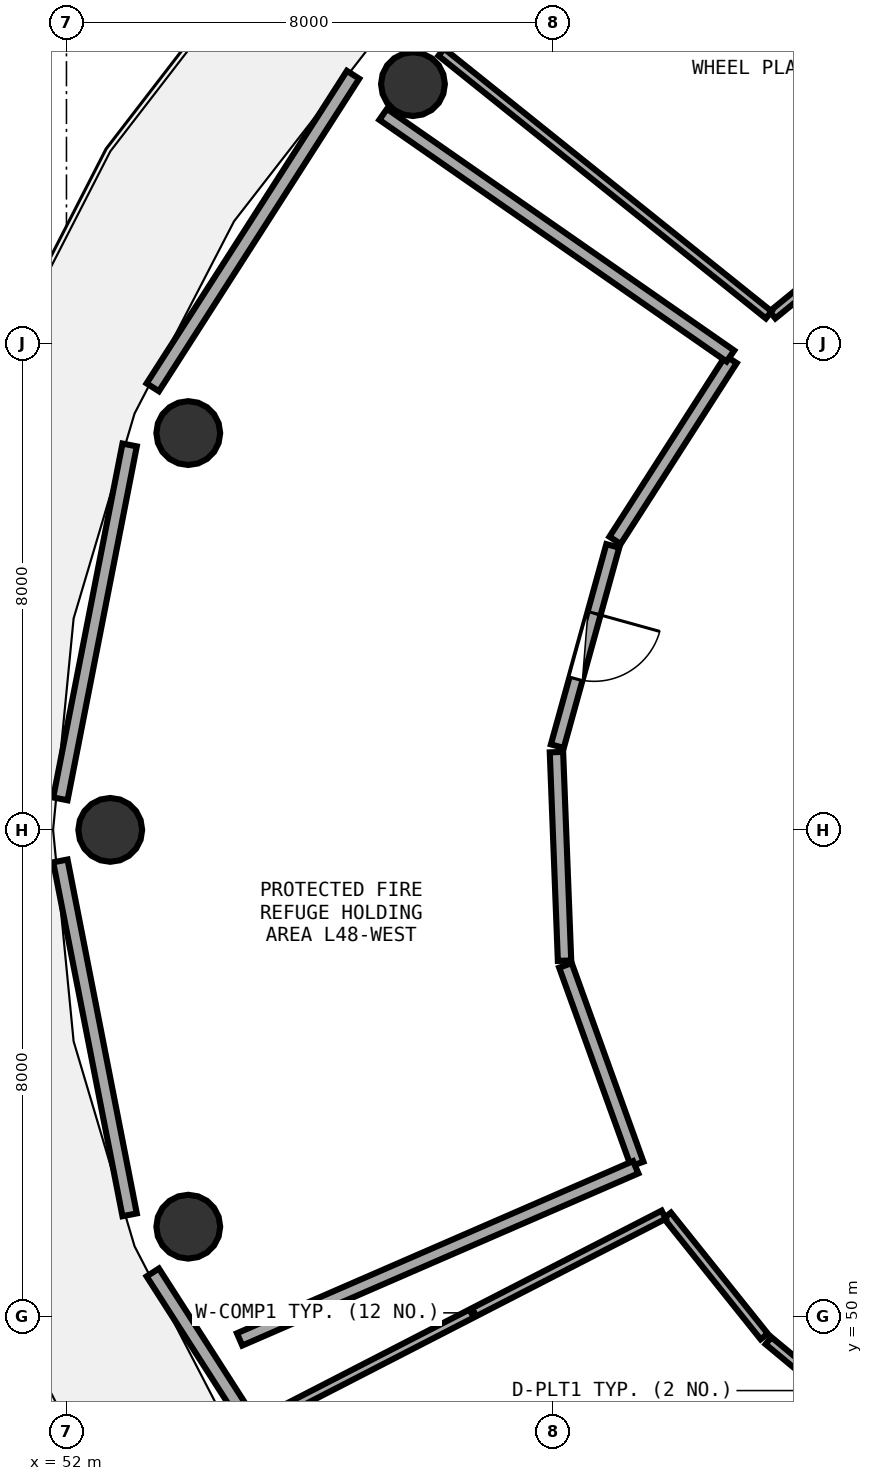
"""IFC4 building model, lengths in metres.
Left out: names, types, materials, properties, quantities, classifications, styles, units other than length and angle.
Written with IfcOpenShell. Run it as: python <this file> out.ifc"""

import sys

from ifc_helpers import new_model, si_unit, direction, frame, frame_2d, origin, origin_2d, place, context, subcontext, project, spatial, rectangle, circle, extrude, element, fill, save


model = new_model("IFC4")
c1 = context("Model", 3, precision=1e-05, world=origin(), true_north=direction((0.0, 1.0)))
c2 = subcontext(c1, "Body", "Model", "MODEL_VIEW")
j1 = project(units=[si_unit("LENGTHUNIT", "METRE"), si_unit("PLANEANGLEUNIT", "RADIAN")], contexts=[c1])
p1 = place(None, origin())
s1 = spatial("IfcSite", under=j1, at=p1, CompositionType="ELEMENT")
p2 = place(p1, origin())
s2 = spatial("IfcBuilding", under=s1, at=p2, CompositionType="ELEMENT")
p3 = place(p2, frame((0.0, 0.0, 189.11)))
s3 = spatial("IfcBuildingStorey", under=s2, at=p3, CompositionType="ELEMENT", Elevation=189.11)
for number, where, z_axis, x_axis in (
    (1, (57.698, 70.264, 0.0), (0.0, 0.0, 1.0), (1.0, 0.0, 0.0)),
    (2, (54.003, 64.526, 0.0), (0.0, 0.0, 1.0), (1.0, 0.0, 0.0)),
    (3, (52.72, 58.0, 0.0), (0.0, 0.0, 1.0), (1.0, 0.0, 0.0)),
    (4, (54.003, 51.474, 0.0), (0.0, 0.0, 1.0), (1.0, 0.0, 0.0)),
):
    element("IfcColumn", number, at=place(p3, frame(where, z_axis=z_axis, x_axis=x_axis)), inside=s3, PredefinedType="COLUMN", context=c2, shape_type="SweptSolid", body=[
        extrude(circle(Radius=0.525, at=origin_2d()), origin(), (0.0, 0.0, 1.0), 4.09),
    ])
p4 = place(p3, frame((56.713, 70.418, 0.0), z_axis=(0.0, 0.0, 1.0), x_axis=(-0.539556360139, -0.841949484371, 0.0)))
e5 = element("IfcWall", 5, at=p4, inside=s3, PredefinedType="SOLIDWALL", context=c2, shape_type="SweptSolid", body=[
    extrude(rectangle(XDim=6.104, YDim=0.24, at=frame_2d((3.052, 0.0))), origin(), (0.0, 0.0, 1.0), 3.815),
])
for number, where, z_axis, x_axis in (
    (6, (53.039, 64.33, 0.0), (0.0, 0.0, 1.0), (-0.192, -0.981, 0.0)),
    (7, (51.9, 57.49, 0.0), (0.0, 0.0, 1.0), (0.192, -0.981, 0.0)),
):
    element("IfcWall", number, at=place(p3, frame(where, z_axis=z_axis, x_axis=x_axis)), inside=s3, PredefinedType="SOLIDWALL", context=c2, shape_type="SweptSolid", body=[
        extrude(rectangle(XDim=5.93, YDim=0.24, at=frame_2d((2.965, 0.0))), origin(), (0.0, 0.0, 1.0), 3.815),
    ])
p5 = place(p3, frame((53.419, 50.722, 0.0), z_axis=(0.0, 0.0, 1.0), x_axis=(0.539556360139, -0.841949484371, 0.0)))
e8 = element("IfcWall", 8, at=p5, inside=s3, PredefinedType="SOLIDWALL", context=c2, shape_type="SweptSolid", body=[
    extrude(rectangle(XDim=6.104, YDim=0.24, at=frame_2d((3.052, 0.0))), origin(), (0.0, 0.0, 1.0), 3.815),
])
p6 = place(p3, frame((60.985, 62.67, 0.0), z_axis=(0.0, 0.0, 1.0), x_axis=(-0.266899498811, -0.96372436803, 0.0)))
e9 = element("IfcWall", 9, at=p6, inside=s3, PredefinedType="SOLIDWALL", context=c2, shape_type="SweptSolid", body=[
    extrude(rectangle(XDim=3.417, YDim=0.22, at=frame_2d((1.709, 0.0))), origin(), (0.0, 0.0, 1.0), 3.82),
])
p7 = place(p6, frame((1.149, 0.0, 0.0)))
e10 = element("IfcOpeningElement", 10, at=p7, cuts=e9, PredefinedType="OPENING", context=c2, shape_type="SweptSolid", body=[
    extrude(rectangle(XDim=1.12, YDim=2.1, at=frame_2d((0.56, 1.05))), frame((0.0, 0.12, 0.0), z_axis=(0.0, -1.0, 0.0), x_axis=(1.0, 0.0, 0.0)), (0.0, 0.0, 1.0), 0.24),
])
p8 = place(p3, frame((63.546, 49.6, 0.0), z_axis=(0.0, 0.0, 1.0), x_axis=(0.768626986837, -0.639697237063, 0.0)))
e11 = element("IfcWall", 11, at=p8, inside=s3, PredefinedType="PARTITIONING", context=c2, shape_type="SweptSolid", body=[
    extrude(rectangle(XDim=2.564, YDim=0.15, at=frame_2d((1.282, 0.0))), origin(), (0.0, 0.0, 1.0), 3.365),
])
p9 = place(p8, frame((0.742, 0.0, 0.0)))
e12 = element("IfcOpeningElement", 12, at=p9, cuts=e11, PredefinedType="OPENING", context=c2, shape_type="SweptSolid", body=[
    extrude(rectangle(XDim=1.08, YDim=2.1, at=frame_2d((0.54, 1.05))), frame((0.0, 0.085, 0.0), z_axis=(0.0, -1.0, 0.0), x_axis=(1.0, 0.0, 0.0)), (0.0, 0.0, 1.0), 0.17),
])
p10 = place(p3, frame((65.63, 68.12, 0.0), z_axis=(0.0, 0.0, 1.0), x_axis=(-0.774061607798, -0.633110280546, 0.0)))
e13 = element("IfcWall", 13, at=p10, inside=s3, PredefinedType="PARTITIONING", context=c2, shape_type="SweptSolid", body=[
    extrude(rectangle(XDim=2.607, YDim=0.15, at=frame_2d((1.303, 0.0))), origin(), (0.0, 0.0, 1.0), 3.365),
])
p11 = place(p3, frame((63.55, 66.469, 0.0), z_axis=(0.0, 0.0, 1.0), x_axis=(-0.77998820796, 0.625794211737, 0.0)))
e14 = element("IfcWall", 14, at=p11, inside=s3, PredefinedType="PARTITIONING", context=c2, shape_type="SweptSolid", body=[
    extrude(rectangle(XDim=6.903, YDim=0.15, at=frame_2d((3.452, 0.0))), origin(), (0.0, 0.0, 1.0), 3.365),
])
p12 = place(p3, frame((62.93, 65.736, 0.0), z_axis=(0.0, 0.0, 1.0), x_axis=(-0.539849412271, -0.841761612376, 0.0)))
e15 = element("IfcWall", 15, at=p12, inside=s3, PredefinedType="SOLIDWALL", context=c2, shape_type="SweptSolid", body=[
    extrude(rectangle(XDim=3.534, YDim=0.22, at=frame_2d((1.767, 0.0))), origin(), (0.0, 0.0, 1.0), 3.365),
])
p13 = place(p3, frame((60.059, 59.279, 0.0), z_axis=(0.0, 0.0, 1.0), x_axis=(0.038692620907, -0.999251160163, 0.0)))
e16 = element("IfcWall", 16, at=p13, inside=s3, PredefinedType="SOLIDWALL", context=c2, shape_type="SweptSolid", body=[
    extrude(rectangle(XDim=3.433, YDim=0.22, at=frame_2d((1.716, 0.0))), origin(), (0.0, 0.0, 1.0), 3.365),
])
p14 = place(p3, frame((60.207, 55.771, 0.0), z_axis=(0.0, 0.0, 1.0), x_axis=(0.339545974416, -0.940589459466, 0.0)))
e17 = element("IfcWall", 17, at=p14, inside=s3, PredefinedType="SOLIDWALL", context=c2, shape_type="SweptSolid", body=[
    extrude(rectangle(XDim=3.472, YDim=0.22, at=frame_2d((1.736, 0.0))), origin(), (0.0, 0.0, 1.0), 3.575),
])
p15 = place(p3, frame((61.362, 52.452, 0.0), z_axis=(0.0, 0.0, 1.0), x_axis=(-0.917129606151, -0.398589118668, 0.0)))
e18 = element("IfcWall", 18, at=p15, inside=s3, PredefinedType="SOLIDWALL", context=c2, shape_type="SweptSolid", body=[
    extrude(rectangle(XDim=7.103, YDim=0.22, at=frame_2d((3.552, 0.0))), origin(), (0.0, 0.0, 1.0), 3.365),
])
p16 = place(p3, frame((57.209, 69.767, 0.0), z_axis=(0.0, 0.0, 1.0), x_axis=(0.820778585788, -0.571246455667, 0.0)))
e19 = element("IfcWall", 19, at=p16, inside=s3, PredefinedType="SOLIDWALL", context=c2, shape_type="SweptSolid", body=[
    extrude(rectangle(XDim=6.957, YDim=0.22, at=frame_2d((3.479, 0.0))), origin(), (0.0, 0.0, 1.0), 3.415),
])
p17 = place(p3, frame((61.883, 51.659, 0.0), z_axis=(0.0, 0.0, 1.0), x_axis=(0.62480020311, -0.780784673385, 0.0)))
e20 = element("IfcWall", 20, at=p17, inside=s3, PredefinedType="PARTITIONING", context=c2, shape_type="SweptSolid", body=[
    extrude(rectangle(XDim=2.548, YDim=0.15, at=frame_2d((1.274, 0.0))), origin(), (0.0, 0.0, 1.0), 3.365),
])
p18 = place(p3, frame((55.546, 48.443, 0.0), z_axis=(0.0, 0.0, 1.0), x_axis=(0.889277753714, 0.457367551045, 0.0)))
e21 = element("IfcWall", 21, at=p18, inside=s3, PredefinedType="PARTITIONING", context=c2, shape_type="SweptSolid", body=[
    extrude(rectangle(XDim=7.058, YDim=0.15, at=frame_2d((3.529, 0.0))), origin(), (0.0, 0.0, 1.0), 3.365),
])
p19 = place(p7, origin())
e22 = element("IfcDoor", 22, at=p19, inside=s3, OperationType="SINGLE_SWING_LEFT", PredefinedType="DOOR", context=c2, shape_type="SweptSolid", body=[
    extrude(rectangle(XDim=1.12, YDim=2.1, at=frame_2d((0.56, 1.05))), frame((0.0, 0.025, 0.0), z_axis=(0.0, -1.0, 0.0), x_axis=(1.0, 0.0, 0.0)), (0.0, 0.0, 1.0), 0.05),
])
fill(e10, e22)
save(model, sys.argv[1])
